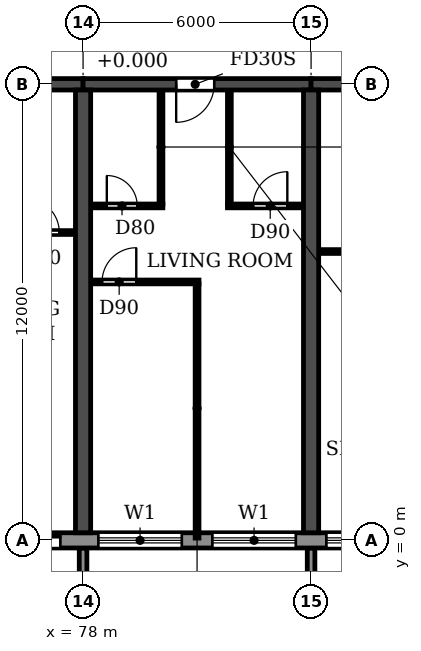
"""IFC4 building model, lengths in metres.
Left out: names, types, materials, properties, quantities, classifications, styles, units other than length and angle.
Written with IfcOpenShell. Run it as: python <this file> out.ifc"""

import sys

from ifc_helpers import new_model, si_unit, direction, frame, frame_2d, origin, place, context, subcontext, project, spatial, polyline, rectangle, outline, extrude, source, transform, mapped, element, fill, save


model = new_model("IFC4")
c1 = context("Model", 3, precision=1e-05, world=origin(), true_north=direction((0.0, 1.0)))
c2 = subcontext(c1, "Body", "Model", "MODEL_VIEW")
j1 = project(units=[si_unit("LENGTHUNIT", "METRE"), si_unit("PLANEANGLEUNIT", "RADIAN")], contexts=[c1])
p1 = place(None, origin())
s1 = spatial("IfcSite", under=j1, at=p1, CompositionType="ELEMENT")
p2 = place(p1, origin())
s2 = spatial("IfcBuilding", under=s1, at=p2, CompositionType="ELEMENT")
p3 = place(p2, frame((0.0, 0.0, 43.2)))
s3 = spatial("IfcBuildingStorey", under=s2, at=p3, CompositionType="ELEMENT", Elevation=43.2)
for number, where, z_axis, x_axis in (
    (1, (78.0, 0.2, 0.0), (0.0, 0.0, 1.0), (0.0, 1.0, 0.0)),
    (2, (84.0, 0.2, 0.0), (0.0, 0.0, 1.0), (0.0, 1.0, 0.0)),
):
    element("IfcWall", number, at=place(p3, frame(where, z_axis=z_axis, x_axis=x_axis)), inside=s3, PredefinedType="SHEAR", context=c2, shape_type="SweptSolid", body=[
        extrude(rectangle(XDim=11.65, YDim=0.4, at=frame_2d((5.825, 0.0))), origin(), (0.0, 0.0, 1.0), 3.05),
    ])
p4 = place(p3, frame((72.0, 12.0, 0.0), z_axis=(0.0, 0.0, 1.0), x_axis=(1.0, 0.0, 0.0)))
e3 = element("IfcWall", 3, at=p4, inside=s3, PredefinedType="SHEAR", context=c2, shape_type="SweptSolid", body=[
    extrude(rectangle(XDim=6.0, YDim=0.3, at=frame_2d((3.0, 0.0))), origin(), (0.0, 0.0, 1.0), 2.45),
])
p5 = place(p4, frame((2.45, 0.0, 0.0)))
e4 = element("IfcOpeningElement", 4, at=p5, cuts=e3, PredefinedType="OPENING", context=c2, shape_type="SweptSolid", body=[
    extrude(rectangle(XDim=1.0, YDim=2.1, at=frame_2d((0.5, 1.05))), frame((0.0, 0.16, 0.0), z_axis=(0.0, -1.0, 0.0), x_axis=(1.0, 0.0, 0.0)), (0.0, 0.0, 1.0), 0.32),
])
p6 = place(p3, frame((78.0, 12.0, 0.0), z_axis=(0.0, 0.0, 1.0), x_axis=(1.0, 0.0, 0.0)))
e5 = element("IfcWall", 5, at=p6, inside=s3, PredefinedType="SHEAR", context=c2, shape_type="SweptSolid", body=[
    extrude(rectangle(XDim=6.0, YDim=0.3, at=frame_2d((3.0, 0.0))), origin(), (0.0, 0.0, 1.0), 2.45),
])
p7 = place(p6, frame((2.45, 0.0, 0.0)))
e6 = element("IfcOpeningElement", 6, at=p7, cuts=e5, PredefinedType="OPENING", context=c2, shape_type="SweptSolid", body=[
    extrude(rectangle(XDim=1.0, YDim=2.1, at=frame_2d((0.5, 1.05))), frame((0.0, 0.16, 0.0), z_axis=(0.0, -1.0, 0.0), x_axis=(1.0, 0.0, 0.0)), (0.0, 0.0, 1.0), 0.32),
])
p8 = place(p3, frame((84.0, 12.0, 0.0), z_axis=(0.0, 0.0, 1.0), x_axis=(1.0, 0.0, 0.0)))
e7 = element("IfcWall", 7, at=p8, inside=s3, PredefinedType="SHEAR", context=c2, shape_type="SweptSolid", body=[
    extrude(rectangle(XDim=6.0, YDim=0.3, at=frame_2d((3.0, 0.0))), origin(), (0.0, 0.0, 1.0), 2.45),
])
p9 = place(p8, frame((2.45, 0.0, 0.0)))
e8 = element("IfcOpeningElement", 8, at=p9, cuts=e7, PredefinedType="OPENING", context=c2, shape_type="SweptSolid", body=[
    extrude(rectangle(XDim=1.0, YDim=2.1, at=frame_2d((0.5, 1.05))), frame((0.0, 0.16, 0.0), z_axis=(0.0, -1.0, 0.0), x_axis=(1.0, 0.0, 0.0)), (0.0, 0.0, 1.0), 0.32),
])
p10 = place(p3, frame((4.683, 0.0, 0.0), z_axis=(0.0, 0.0, 1.0), x_axis=(1.0, 0.0, 0.0)))
e9 = element("IfcWall", 9, at=p10, inside=s3, PredefinedType="STANDARD", context=c2, shape_type="SweptSolid", body=[
    extrude(rectangle(XDim=92.634, YDim=0.4, at=frame_2d((46.317, 0.0))), origin(), (0.0, 0.0, 1.0), 3.05),
])
p11 = place(p10, frame((1.717, 0.0, 0.9)))
e10 = element("IfcOpeningElement", 10, at=p11, cuts=e9, PredefinedType="OPENING", context=c2, shape_type="SweptSolid", body=[
    extrude(rectangle(XDim=2.2, YDim=1.5, at=frame_2d((1.1, 0.75))), frame((0.0, 0.21, 0.0), z_axis=(0.0, -1.0, 0.0), x_axis=(1.0, 0.0, 0.0)), (0.0, 0.0, 1.0), 0.42),
])
p12 = place(p10, frame((4.717, 0.0, 0.9)))
e11 = element("IfcOpeningElement", 11, at=p12, cuts=e9, PredefinedType="OPENING", context=c2, shape_type="SweptSolid", body=[
    extrude(rectangle(XDim=2.2, YDim=1.5, at=frame_2d((1.1, 0.75))), frame((0.0, 0.21, 0.0), z_axis=(0.0, -1.0, 0.0), x_axis=(1.0, 0.0, 0.0)), (0.0, 0.0, 1.0), 0.42),
])
p13 = place(p10, frame((7.717, 0.0, 0.9)))
e12 = element("IfcOpeningElement", 12, at=p13, cuts=e9, PredefinedType="OPENING", context=c2, shape_type="SweptSolid", body=[
    extrude(rectangle(XDim=2.2, YDim=1.5, at=frame_2d((1.1, 0.75))), frame((0.0, 0.21, 0.0), z_axis=(0.0, -1.0, 0.0), x_axis=(1.0, 0.0, 0.0)), (0.0, 0.0, 1.0), 0.42),
])
p14 = place(p10, frame((10.917, 0.0, 0.0)))
e13 = element("IfcOpeningElement", 13, at=p14, cuts=e9, PredefinedType="OPENING", context=c2, shape_type="SweptSolid", body=[
    extrude(rectangle(XDim=1.8, YDim=2.4, at=frame_2d((0.9, 1.2))), frame((0.0, 0.21, 0.0), z_axis=(0.0, -1.0, 0.0), x_axis=(1.0, 0.0, 0.0)), (0.0, 0.0, 1.0), 0.42),
])
p15 = place(p10, frame((13.717, 0.0, 0.9)))
e14 = element("IfcOpeningElement", 14, at=p15, cuts=e9, PredefinedType="OPENING", context=c2, shape_type="SweptSolid", body=[
    extrude(rectangle(XDim=2.2, YDim=1.5, at=frame_2d((1.1, 0.75))), frame((0.0, 0.21, 0.0), z_axis=(0.0, -1.0, 0.0), x_axis=(1.0, 0.0, 0.0)), (0.0, 0.0, 1.0), 0.42),
])
p16 = place(p10, frame((16.717, 0.0, 0.9)))
e15 = element("IfcOpeningElement", 15, at=p16, cuts=e9, PredefinedType="OPENING", context=c2, shape_type="SweptSolid", body=[
    extrude(rectangle(XDim=2.2, YDim=1.5, at=frame_2d((1.1, 0.75))), frame((0.0, 0.21, 0.0), z_axis=(0.0, -1.0, 0.0), x_axis=(1.0, 0.0, 0.0)), (0.0, 0.0, 1.0), 0.42),
])
p17 = place(p10, frame((19.917, 0.0, 0.0)))
e16 = element("IfcOpeningElement", 16, at=p17, cuts=e9, PredefinedType="OPENING", context=c2, shape_type="SweptSolid", body=[
    extrude(rectangle(XDim=1.8, YDim=2.4, at=frame_2d((0.9, 1.2))), frame((0.0, 0.21, 0.0), z_axis=(0.0, -1.0, 0.0), x_axis=(1.0, 0.0, 0.0)), (0.0, 0.0, 1.0), 0.42),
])
p18 = place(p10, frame((22.717, 0.0, 0.9)))
e17 = element("IfcOpeningElement", 17, at=p18, cuts=e9, PredefinedType="OPENING", context=c2, shape_type="SweptSolid", body=[
    extrude(rectangle(XDim=2.2, YDim=1.5, at=frame_2d((1.1, 0.75))), frame((0.0, 0.21, 0.0), z_axis=(0.0, -1.0, 0.0), x_axis=(1.0, 0.0, 0.0)), (0.0, 0.0, 1.0), 0.42),
])
p19 = place(p10, frame((25.717, 0.0, 0.9)))
e18 = element("IfcOpeningElement", 18, at=p19, cuts=e9, PredefinedType="OPENING", context=c2, shape_type="SweptSolid", body=[
    extrude(rectangle(XDim=2.2, YDim=1.5, at=frame_2d((1.1, 0.75))), frame((0.0, 0.21, 0.0), z_axis=(0.0, -1.0, 0.0), x_axis=(1.0, 0.0, 0.0)), (0.0, 0.0, 1.0), 0.42),
])
p20 = place(p10, frame((28.717, 0.0, 0.9)))
e19 = element("IfcOpeningElement", 19, at=p20, cuts=e9, PredefinedType="OPENING", context=c2, shape_type="SweptSolid", body=[
    extrude(rectangle(XDim=2.2, YDim=1.5, at=frame_2d((1.1, 0.75))), frame((0.0, 0.21, 0.0), z_axis=(0.0, -1.0, 0.0), x_axis=(1.0, 0.0, 0.0)), (0.0, 0.0, 1.0), 0.42),
])
p21 = place(p10, frame((31.717, 0.0, 0.9)))
e20 = element("IfcOpeningElement", 20, at=p21, cuts=e9, PredefinedType="OPENING", context=c2, shape_type="SweptSolid", body=[
    extrude(rectangle(XDim=2.2, YDim=1.5, at=frame_2d((1.1, 0.75))), frame((0.0, 0.21, 0.0), z_axis=(0.0, -1.0, 0.0), x_axis=(1.0, 0.0, 0.0)), (0.0, 0.0, 1.0), 0.42),
])
p22 = place(p10, frame((34.917, 0.0, 0.0)))
e21 = element("IfcOpeningElement", 21, at=p22, cuts=e9, PredefinedType="OPENING", context=c2, shape_type="SweptSolid", body=[
    extrude(rectangle(XDim=1.8, YDim=2.4, at=frame_2d((0.9, 1.2))), frame((0.0, 0.21, 0.0), z_axis=(0.0, -1.0, 0.0), x_axis=(1.0, 0.0, 0.0)), (0.0, 0.0, 1.0), 0.42),
])
p23 = place(p10, frame((37.717, 0.0, 0.9)))
e22 = element("IfcOpeningElement", 22, at=p23, cuts=e9, PredefinedType="OPENING", context=c2, shape_type="SweptSolid", body=[
    extrude(rectangle(XDim=2.2, YDim=1.5, at=frame_2d((1.1, 0.75))), frame((0.0, 0.21, 0.0), z_axis=(0.0, -1.0, 0.0), x_axis=(1.0, 0.0, 0.0)), (0.0, 0.0, 1.0), 0.42),
])
p24 = place(p10, frame((40.717, 0.0, 0.9)))
e23 = element("IfcOpeningElement", 23, at=p24, cuts=e9, PredefinedType="OPENING", context=c2, shape_type="SweptSolid", body=[
    extrude(rectangle(XDim=2.2, YDim=1.5, at=frame_2d((1.1, 0.75))), frame((0.0, 0.21, 0.0), z_axis=(0.0, -1.0, 0.0), x_axis=(1.0, 0.0, 0.0)), (0.0, 0.0, 1.0), 0.42),
])
p25 = place(p10, frame((43.717, 0.0, 0.9)))
e24 = element("IfcOpeningElement", 24, at=p25, cuts=e9, PredefinedType="OPENING", context=c2, shape_type="SweptSolid", body=[
    extrude(rectangle(XDim=2.2, YDim=1.5, at=frame_2d((1.1, 0.75))), frame((0.0, 0.21, 0.0), z_axis=(0.0, -1.0, 0.0), x_axis=(1.0, 0.0, 0.0)), (0.0, 0.0, 1.0), 0.42),
])
p26 = place(p10, frame((46.917, 0.0, 0.0)))
e25 = element("IfcOpeningElement", 25, at=p26, cuts=e9, PredefinedType="OPENING", context=c2, shape_type="SweptSolid", body=[
    extrude(rectangle(XDim=1.8, YDim=2.4, at=frame_2d((0.9, 1.2))), frame((0.0, 0.21, 0.0), z_axis=(0.0, -1.0, 0.0), x_axis=(1.0, 0.0, 0.0)), (0.0, 0.0, 1.0), 0.42),
])
p27 = place(p10, frame((49.717, 0.0, 0.9)))
e26 = element("IfcOpeningElement", 26, at=p27, cuts=e9, PredefinedType="OPENING", context=c2, shape_type="SweptSolid", body=[
    extrude(rectangle(XDim=2.2, YDim=1.5, at=frame_2d((1.1, 0.75))), frame((0.0, 0.21, 0.0), z_axis=(0.0, -1.0, 0.0), x_axis=(1.0, 0.0, 0.0)), (0.0, 0.0, 1.0), 0.42),
])
p28 = place(p10, frame((52.717, 0.0, 0.9)))
e27 = element("IfcOpeningElement", 27, at=p28, cuts=e9, PredefinedType="OPENING", context=c2, shape_type="SweptSolid", body=[
    extrude(rectangle(XDim=2.2, YDim=1.5, at=frame_2d((1.1, 0.75))), frame((0.0, 0.21, 0.0), z_axis=(0.0, -1.0, 0.0), x_axis=(1.0, 0.0, 0.0)), (0.0, 0.0, 1.0), 0.42),
])
p29 = place(p10, frame((55.717, 0.0, 0.9)))
e28 = element("IfcOpeningElement", 28, at=p29, cuts=e9, PredefinedType="OPENING", context=c2, shape_type="SweptSolid", body=[
    extrude(rectangle(XDim=2.2, YDim=1.5, at=frame_2d((1.1, 0.75))), frame((0.0, 0.21, 0.0), z_axis=(0.0, -1.0, 0.0), x_axis=(1.0, 0.0, 0.0)), (0.0, 0.0, 1.0), 0.42),
])
p30 = place(p10, frame((58.917, 0.0, 0.0)))
e29 = element("IfcOpeningElement", 29, at=p30, cuts=e9, PredefinedType="OPENING", context=c2, shape_type="SweptSolid", body=[
    extrude(rectangle(XDim=1.8, YDim=2.4, at=frame_2d((0.9, 1.2))), frame((0.0, 0.21, 0.0), z_axis=(0.0, -1.0, 0.0), x_axis=(1.0, 0.0, 0.0)), (0.0, 0.0, 1.0), 0.42),
])
p31 = place(p10, frame((61.717, 0.0, 0.9)))
e30 = element("IfcOpeningElement", 30, at=p31, cuts=e9, PredefinedType="OPENING", context=c2, shape_type="SweptSolid", body=[
    extrude(rectangle(XDim=2.2, YDim=1.5, at=frame_2d((1.1, 0.75))), frame((0.0, 0.21, 0.0), z_axis=(0.0, -1.0, 0.0), x_axis=(1.0, 0.0, 0.0)), (0.0, 0.0, 1.0), 0.42),
])
p32 = place(p10, frame((64.717, 0.0, 0.9)))
e31 = element("IfcOpeningElement", 31, at=p32, cuts=e9, PredefinedType="OPENING", context=c2, shape_type="SweptSolid", body=[
    extrude(rectangle(XDim=2.2, YDim=1.5, at=frame_2d((1.1, 0.75))), frame((0.0, 0.21, 0.0), z_axis=(0.0, -1.0, 0.0), x_axis=(1.0, 0.0, 0.0)), (0.0, 0.0, 1.0), 0.42),
])
p33 = place(p10, frame((67.717, 0.0, 0.9)))
e32 = element("IfcOpeningElement", 32, at=p33, cuts=e9, PredefinedType="OPENING", context=c2, shape_type="SweptSolid", body=[
    extrude(rectangle(XDim=2.2, YDim=1.5, at=frame_2d((1.1, 0.75))), frame((0.0, 0.21, 0.0), z_axis=(0.0, -1.0, 0.0), x_axis=(1.0, 0.0, 0.0)), (0.0, 0.0, 1.0), 0.42),
])
p34 = place(p10, frame((70.917, 0.0, 0.0)))
e33 = element("IfcOpeningElement", 33, at=p34, cuts=e9, PredefinedType="OPENING", context=c2, shape_type="SweptSolid", body=[
    extrude(rectangle(XDim=1.8, YDim=2.4, at=frame_2d((0.9, 1.2))), frame((0.0, 0.21, 0.0), z_axis=(0.0, -1.0, 0.0), x_axis=(1.0, 0.0, 0.0)), (0.0, 0.0, 1.0), 0.42),
])
p35 = place(p10, frame((73.717, 0.0, 0.9)))
e34 = element("IfcOpeningElement", 34, at=p35, cuts=e9, PredefinedType="OPENING", context=c2, shape_type="SweptSolid", body=[
    extrude(rectangle(XDim=2.2, YDim=1.5, at=frame_2d((1.1, 0.75))), frame((0.0, 0.21, 0.0), z_axis=(0.0, -1.0, 0.0), x_axis=(1.0, 0.0, 0.0)), (0.0, 0.0, 1.0), 0.42),
])
p36 = place(p10, frame((76.717, 0.0, 0.9)))
e35 = element("IfcOpeningElement", 35, at=p36, cuts=e9, PredefinedType="OPENING", context=c2, shape_type="SweptSolid", body=[
    extrude(rectangle(XDim=2.2, YDim=1.5, at=frame_2d((1.1, 0.75))), frame((0.0, 0.21, 0.0), z_axis=(0.0, -1.0, 0.0), x_axis=(1.0, 0.0, 0.0)), (0.0, 0.0, 1.0), 0.42),
])
p37 = place(p10, frame((79.717, 0.0, 0.9)))
e36 = element("IfcOpeningElement", 36, at=p37, cuts=e9, PredefinedType="OPENING", context=c2, shape_type="SweptSolid", body=[
    extrude(rectangle(XDim=2.2, YDim=1.5, at=frame_2d((1.1, 0.75))), frame((0.0, 0.21, 0.0), z_axis=(0.0, -1.0, 0.0), x_axis=(1.0, 0.0, 0.0)), (0.0, 0.0, 1.0), 0.42),
])
p38 = place(p10, frame((82.917, 0.0, 0.0)))
e37 = element("IfcOpeningElement", 37, at=p38, cuts=e9, PredefinedType="OPENING", context=c2, shape_type="SweptSolid", body=[
    extrude(rectangle(XDim=1.8, YDim=2.4, at=frame_2d((0.9, 1.2))), frame((0.0, 0.21, 0.0), z_axis=(0.0, -1.0, 0.0), x_axis=(1.0, 0.0, 0.0)), (0.0, 0.0, 1.0), 0.42),
])
p39 = place(p10, frame((85.717, 0.0, 0.9)))
e38 = element("IfcOpeningElement", 38, at=p39, cuts=e9, PredefinedType="OPENING", context=c2, shape_type="SweptSolid", body=[
    extrude(rectangle(XDim=2.2, YDim=1.5, at=frame_2d((1.1, 0.75))), frame((0.0, 0.21, 0.0), z_axis=(0.0, -1.0, 0.0), x_axis=(1.0, 0.0, 0.0)), (0.0, 0.0, 1.0), 0.42),
])
p40 = place(p10, frame((88.717, 0.0, 0.9)))
e39 = element("IfcOpeningElement", 39, at=p40, cuts=e9, PredefinedType="OPENING", context=c2, shape_type="SweptSolid", body=[
    extrude(rectangle(XDim=2.2, YDim=1.5, at=frame_2d((1.1, 0.75))), frame((0.0, 0.21, 0.0), z_axis=(0.0, -1.0, 0.0), x_axis=(1.0, 0.0, 0.0)), (0.0, 0.0, 1.0), 0.42),
])
m1 = source(origin(), c2, "Body", "SweptSolid", [
    extrude(outline(polyline([(0.0, 0.0), (0.2, 0.0), (0.2, 1.65), (0.0, 1.65), (0.0, 0.0)])), origin(), (0.0, 0.0, 1.0), 3.1),
])
for number, where in (
    (40, (77.9, -1.85, 0.0)),
    (41, (83.9, -1.85, 0.0)),
):
    element("IfcWall", number, at=place(p3, frame(where)), inside=s3, PredefinedType="STANDARD", context=c2, shape_type="MappedRepresentation", body=[
        mapped(m1, transform((0.0, 0.0, 0.0))),
    ])
p41 = place(p3, frame((78.21, 6.8, 0.0), z_axis=(0.0, 0.0, 1.0), x_axis=(1.0, 0.0, 0.0)))
e42 = element("IfcWall", 42, at=p41, inside=s3, PredefinedType="PARTITIONING", context=c2, shape_type="SweptSolid", body=[
    extrude(rectangle(XDim=2.84, YDim=0.1, at=frame_2d((1.42, 0.0))), origin(), (0.0, 0.0, 1.0), 3.05),
])
p42 = place(p41, frame((0.29, 0.0, 0.0)))
e43 = element("IfcOpeningElement", 43, at=p42, cuts=e42, PredefinedType="OPENING", context=c2, shape_type="SweptSolid", body=[
    extrude(rectangle(XDim=0.9, YDim=2.1, at=frame_2d((0.45, 1.05))), frame((0.0, 0.06, 0.0), z_axis=(0.0, -1.0, 0.0), x_axis=(1.0, 0.0, 0.0)), (0.0, 0.0, 1.0), 0.12),
])
p43 = place(p3, frame((84.21, 7.6, 0.0), z_axis=(0.0, 0.0, 1.0), x_axis=(1.0, 0.0, 0.0)))
e44 = element("IfcWall", 44, at=p43, inside=s3, PredefinedType="PARTITIONING", context=c2, shape_type="SweptSolid", body=[
    extrude(rectangle(XDim=1.89, YDim=0.1, at=frame_2d((0.945, 0.0))), origin(), (0.0, 0.0, 1.0), 3.05),
])
p44 = place(p3, frame((75.8, 8.1, 0.0), z_axis=(0.0, 0.0, 1.0), x_axis=(1.0, 0.0, 0.0)))
e45 = element("IfcWall", 45, at=p44, inside=s3, PredefinedType="PARTITIONING", context=c2, shape_type="SweptSolid", body=[
    extrude(rectangle(XDim=1.99, YDim=0.1, at=frame_2d((0.995, 0.0))), origin(), (0.0, 0.0, 1.0), 3.05),
])
p45 = place(p44, frame((0.675, 0.0, 0.0)))
e46 = element("IfcOpeningElement", 46, at=p45, cuts=e45, PredefinedType="OPENING", context=c2, shape_type="SweptSolid", body=[
    extrude(rectangle(XDim=0.9, YDim=2.1, at=frame_2d((0.45, 1.05))), frame((0.0, 0.06, 0.0), z_axis=(0.0, -1.0, 0.0), x_axis=(1.0, 0.0, 0.0)), (0.0, 0.0, 1.0), 0.12),
])
p46 = place(p3, frame((78.21, 8.8, 0.0), z_axis=(0.0, 0.0, 1.0), x_axis=(1.0, 0.0, 0.0)))
e47 = element("IfcWall", 47, at=p46, inside=s3, PredefinedType="PARTITIONING", context=c2, shape_type="SweptSolid", body=[
    extrude(rectangle(XDim=1.89, YDim=0.1, at=frame_2d((0.945, 0.0))), origin(), (0.0, 0.0, 1.0), 3.05),
])
p47 = place(p46, frame((0.415, 0.0, 0.0)))
e48 = element("IfcOpeningElement", 48, at=p47, cuts=e47, PredefinedType="OPENING", context=c2, shape_type="SweptSolid", body=[
    extrude(rectangle(XDim=0.8, YDim=2.1, at=frame_2d((0.4, 1.05))), frame((0.0, 0.06, 0.0), z_axis=(0.0, -1.0, 0.0), x_axis=(1.0, 0.0, 0.0)), (0.0, 0.0, 1.0), 0.12),
])
p48 = place(p3, frame((81.8, 8.8, 0.0), z_axis=(0.0, 0.0, 1.0), x_axis=(1.0, 0.0, 0.0)))
e49 = element("IfcWall", 49, at=p48, inside=s3, PredefinedType="PARTITIONING", context=c2, shape_type="SweptSolid", body=[
    extrude(rectangle(XDim=1.99, YDim=0.1, at=frame_2d((0.995, 0.0))), origin(), (0.0, 0.0, 1.0), 3.05),
])
p49 = place(p48, frame((0.675, 0.0, 0.0)))
e50 = element("IfcOpeningElement", 50, at=p49, cuts=e49, PredefinedType="OPENING", context=c2, shape_type="SweptSolid", body=[
    extrude(rectangle(XDim=0.9, YDim=2.1, at=frame_2d((0.45, 1.05))), frame((0.0, 0.06, 0.0), z_axis=(0.0, -1.0, 0.0), x_axis=(1.0, 0.0, 0.0)), (0.0, 0.0, 1.0), 0.12),
])
p50 = place(p3, frame((80.05, 8.85, 0.0), z_axis=(0.0, 0.0, 1.0), x_axis=(0.0, 1.0, 0.0)))
e51 = element("IfcWall", 51, at=p50, inside=s3, PredefinedType="PARTITIONING", context=c2, shape_type="SweptSolid", body=[
    extrude(rectangle(XDim=2.99, YDim=0.1, at=frame_2d((1.495, 0.0))), origin(), (0.0, 0.0, 1.0), 3.05),
])
p51 = place(p3, frame((81.0, 0.06, 0.0), z_axis=(0.0, 0.0, 1.0), x_axis=(0.0, 1.0, 0.0)))
e52 = element("IfcWall", 52, at=p51, inside=s3, PredefinedType="PARTITIONING", context=c2, shape_type="SweptSolid", body=[
    extrude(rectangle(XDim=6.69, YDim=0.1, at=frame_2d((3.345, 0.0))), origin(), (0.0, 0.0, 1.0), 3.05),
])
p52 = place(p3, frame((81.85, 8.85, 0.0), z_axis=(0.0, 0.0, 1.0), x_axis=(0.0, 1.0, 0.0)))
e53 = element("IfcWall", 53, at=p52, inside=s3, PredefinedType="PARTITIONING", context=c2, shape_type="SweptSolid", body=[
    extrude(rectangle(XDim=2.99, YDim=0.1, at=frame_2d((1.495, 0.0))), origin(), (0.0, 0.0, 1.0), 3.05),
])
p53 = place(p34, origin())
e54 = element("IfcDoor", 54, at=p53, inside=s3, OperationType="DOUBLE_DOOR_SLIDING", PredefinedType="DOOR", context=c2, shape_type="SweptSolid", body=[
    extrude(rectangle(XDim=1.8, YDim=2.4, at=frame_2d((0.9, 1.2))), frame((0.0, 0.025, 0.0), z_axis=(0.0, -1.0, 0.0), x_axis=(1.0, 0.0, 0.0)), (0.0, 0.0, 1.0), 0.05),
])
fill(e33, e54)
p54 = place(p35, origin())
e55 = element("IfcWindow", 55, at=p54, inside=s3, PartitioningType="DOUBLE_PANEL_HORIZONTAL", PredefinedType="WINDOW", context=c2, shape_type="SweptSolid", body=[
    extrude(rectangle(XDim=2.2, YDim=1.5, at=frame_2d((1.1, 0.75))), frame((0.0, 0.03, 0.0), z_axis=(0.0, -1.0, 0.0), x_axis=(1.0, 0.0, 0.0)), (0.0, 0.0, 1.0), 0.06),
])
fill(e34, e55)
p55 = place(p36, origin())
e56 = element("IfcWindow", 56, at=p55, inside=s3, PartitioningType="DOUBLE_PANEL_HORIZONTAL", PredefinedType="WINDOW", context=c2, shape_type="SweptSolid", body=[
    extrude(rectangle(XDim=2.2, YDim=1.5, at=frame_2d((1.1, 0.75))), frame((0.0, 0.03, 0.0), z_axis=(0.0, -1.0, 0.0), x_axis=(1.0, 0.0, 0.0)), (0.0, 0.0, 1.0), 0.06),
])
fill(e35, e56)
p56 = place(p37, origin())
e57 = element("IfcWindow", 57, at=p56, inside=s3, PartitioningType="DOUBLE_PANEL_HORIZONTAL", PredefinedType="WINDOW", context=c2, shape_type="SweptSolid", body=[
    extrude(rectangle(XDim=2.2, YDim=1.5, at=frame_2d((1.1, 0.75))), frame((0.0, 0.03, 0.0), z_axis=(0.0, -1.0, 0.0), x_axis=(1.0, 0.0, 0.0)), (0.0, 0.0, 1.0), 0.06),
])
fill(e36, e57)
p57 = place(p45, origin())
e58 = element("IfcDoor", 58, at=p57, inside=s3, OperationType="SINGLE_SWING_LEFT", PredefinedType="DOOR", context=c2, shape_type="SweptSolid", body=[
    extrude(rectangle(XDim=0.9, YDim=2.1, at=frame_2d((0.45, 1.05))), frame((0.0, 0.025, 0.0), z_axis=(0.0, -1.0, 0.0), x_axis=(1.0, 0.0, 0.0)), (0.0, 0.0, 1.0), 0.05),
])
fill(e46, e58)
p58 = place(p42, origin())
e59 = element("IfcDoor", 59, at=p58, inside=s3, OperationType="SINGLE_SWING_RIGHT", PredefinedType="DOOR", context=c2, shape_type="SweptSolid", body=[
    extrude(rectangle(XDim=0.9, YDim=2.1, at=frame_2d((0.45, 1.05))), frame((0.0, 0.025, 0.0), z_axis=(0.0, -1.0, 0.0), x_axis=(1.0, 0.0, 0.0)), (0.0, 0.0, 1.0), 0.05),
])
fill(e43, e59)
p59 = place(p47, origin())
e60 = element("IfcDoor", 60, at=p59, inside=s3, OperationType="SINGLE_SWING_LEFT", PredefinedType="DOOR", context=c2, shape_type="SweptSolid", body=[
    extrude(rectangle(XDim=0.8, YDim=2.1, at=frame_2d((0.4, 1.05))), frame((0.0, 0.025, 0.0), z_axis=(0.0, -1.0, 0.0), x_axis=(1.0, 0.0, 0.0)), (0.0, 0.0, 1.0), 0.05),
])
fill(e48, e60)
p60 = place(p7, frame((1.0, 0.0, 0.0), z_axis=(0.0, 0.0, 1.0), x_axis=(-1.0, 0.0, 0.0)))
e61 = element("IfcDoor", 61, at=p60, inside=s3, OperationType="SINGLE_SWING_RIGHT", PredefinedType="DOOR", context=c2, shape_type="SweptSolid", body=[
    extrude(rectangle(XDim=1.0, YDim=2.1, at=frame_2d((0.5, 1.05))), frame((0.0, 0.025, 0.0), z_axis=(0.0, -1.0, 0.0), x_axis=(1.0, 0.0, 0.0)), (0.0, 0.0, 1.0), 0.05),
])
fill(e6, e61)
p61 = place(p49, origin())
e62 = element("IfcDoor", 62, at=p61, inside=s3, OperationType="SINGLE_SWING_RIGHT", PredefinedType="DOOR", context=c2, shape_type="SweptSolid", body=[
    extrude(rectangle(XDim=0.9, YDim=2.1, at=frame_2d((0.45, 1.05))), frame((0.0, 0.025, 0.0), z_axis=(0.0, -1.0, 0.0), x_axis=(1.0, 0.0, 0.0)), (0.0, 0.0, 1.0), 0.05),
])
fill(e50, e62)
save(model, sys.argv[1])
